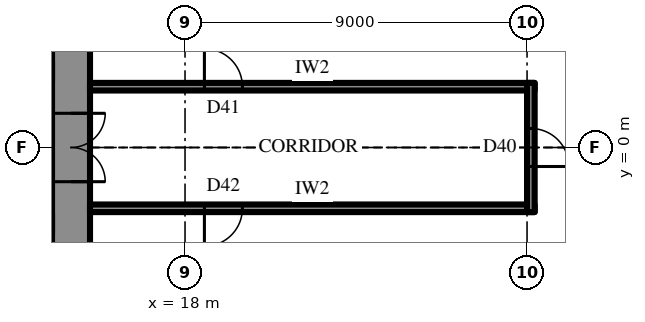
"""IFC4 building model, lengths in metres.
Left out: names, types, materials, properties, quantities, classifications, styles, units other than length and angle.
Written with IfcOpenShell. Run it as: python <this file> out.ifc"""

import sys

from ifc_helpers import new_model, si_unit, direction, frame, frame_2d, origin, place, context, subcontext, project, spatial, rectangle, extrude, element, fill, save


model = new_model("IFC4")
c1 = context("Model", 3, precision=1e-05, world=origin(), true_north=direction((0.0, 1.0)))
c2 = subcontext(c1, "Body", "Model", "MODEL_VIEW")
j1 = project(units=[si_unit("LENGTHUNIT", "METRE"), si_unit("PLANEANGLEUNIT", "RADIAN")], contexts=[c1])
p1 = place(None, origin())
s1 = spatial("IfcSite", under=j1, at=p1, CompositionType="ELEMENT")
p2 = place(p1, origin())
s2 = spatial("IfcBuilding", under=s1, at=p2, CompositionType="ELEMENT")
p3 = place(p2, frame((0.0, 0.0, 236.5)))
s3 = spatial("IfcBuildingStorey", under=s2, at=p3, CompositionType="ELEMENT", Elevation=236.5)
p4 = place(p3, frame((15.0, -10.7, 0.0), z_axis=(0.0, 0.0, 1.0), x_axis=(0.0, 1.0, 0.0)))
e1 = element("IfcWall", 1, at=p4, inside=s3, PredefinedType="SHEAR", context=c2, shape_type="SweptSolid", body=[
    extrude(rectangle(XDim=21.4, YDim=1.0, at=frame_2d((10.7, 0.0))), origin(), (0.0, 0.0, 1.0), 4.2),
])
p5 = place(p4, frame((9.8, 0.0, 0.0)))
e2 = element("IfcOpeningElement", 2, at=p5, cuts=e1, PredefinedType="OPENING", context=c2, shape_type="SweptSolid", body=[
    extrude(rectangle(XDim=1.8, YDim=2.4, at=frame_2d((0.9, 1.2))), frame((0.0, 0.51, 0.0), z_axis=(0.0, -1.0, 0.0), x_axis=(1.0, 0.0, 0.0)), (0.0, 0.0, 1.0), 1.02),
])
p6 = place(p3, frame((12.3, 2.0, 0.0), z_axis=(0.0, 0.0, 1.0), x_axis=(1.0, 0.0, 0.0)))
e3 = element("IfcWall", 3, at=p6, inside=s3, PredefinedType="SHEAR", context=c2, shape_type="SweptSolid", body=[
    extrude(rectangle(XDim=2.2, YDim=0.5, at=frame_2d((1.1, 0.0))), origin(), (0.0, 0.0, 1.0), 4.2),
])
p7 = place(p6, frame((0.8, 0.0, 0.0)))
e4 = element("IfcOpeningElement", 4, at=p7, cuts=e3, PredefinedType="OPENING", context=c2, shape_type="SweptSolid", body=[
    extrude(rectangle(XDim=0.9, YDim=2.2, at=frame_2d((0.45, 1.1))), frame((0.0, 0.26, 0.0), z_axis=(0.0, -1.0, 0.0), x_axis=(1.0, 0.0, 0.0)), (0.0, 0.0, 1.0), 0.52),
])
p8 = place(p3, frame((15.5, 1.6, 0.0), z_axis=(0.0, 0.0, 1.0), x_axis=(1.0, 0.0, 0.0)))
e5 = element("IfcWall", 5, at=p8, inside=s3, PredefinedType="PARTITIONING", context=c2, shape_type="SweptSolid", body=[
    extrude(rectangle(XDim=11.7, YDim=0.2, at=frame_2d((5.85, 0.0))), origin(), (0.0, 0.0, 1.0), 4.0),
])
p9 = place(p8, frame((3.01, 0.0, 0.0)))
e6 = element("IfcOpeningElement", 6, at=p9, cuts=e5, PredefinedType="OPENING", context=c2, shape_type="SweptSolid", body=[
    extrude(rectangle(XDim=1.0, YDim=2.2, at=frame_2d((0.5, 1.1))), frame((0.0, 0.11, 0.0), z_axis=(0.0, -1.0, 0.0), x_axis=(1.0, 0.0, 0.0)), (0.0, 0.0, 1.0), 0.22),
])
p10 = place(p3, frame((15.5, -1.6, 0.0), z_axis=(0.0, 0.0, 1.0), x_axis=(1.0, 0.0, 0.0)))
e7 = element("IfcWall", 7, at=p10, inside=s3, PredefinedType="PARTITIONING", context=c2, shape_type="SweptSolid", body=[
    extrude(rectangle(XDim=11.7, YDim=0.2, at=frame_2d((5.85, 0.0))), origin(), (0.0, 0.0, 1.0), 4.0),
])
p11 = place(p10, frame((3.01, 0.0, 0.0)))
e8 = element("IfcOpeningElement", 8, at=p11, cuts=e7, PredefinedType="OPENING", context=c2, shape_type="SweptSolid", body=[
    extrude(rectangle(XDim=1.0, YDim=2.2, at=frame_2d((0.5, 1.1))), frame((0.0, 0.11, 0.0), z_axis=(0.0, -1.0, 0.0), x_axis=(1.0, 0.0, 0.0)), (0.0, 0.0, 1.0), 0.22),
])
p12 = place(p3, frame((27.1, -1.7, 0.0), z_axis=(0.0, 0.0, 1.0), x_axis=(0.0, 1.0, 0.0)))
e9 = element("IfcWall", 9, at=p12, inside=s3, PredefinedType="PARTITIONING", context=c2, shape_type="SweptSolid", body=[
    extrude(rectangle(XDim=3.4, YDim=0.2, at=frame_2d((1.7, 0.0))), origin(), (0.0, 0.0, 1.0), 4.0),
])
p13 = place(p12, frame((1.2, 0.0, 0.0)))
e10 = element("IfcOpeningElement", 10, at=p13, cuts=e9, PredefinedType="OPENING", context=c2, shape_type="SweptSolid", body=[
    extrude(rectangle(XDim=1.0, YDim=2.2, at=frame_2d((0.5, 1.1))), frame((0.0, 0.11, 0.0), z_axis=(0.0, -1.0, 0.0), x_axis=(1.0, 0.0, 0.0)), (0.0, 0.0, 1.0), 0.22),
])
p14 = place(p5, frame((1.8, 0.0, 0.0), z_axis=(0.0, 0.0, 1.0), x_axis=(-1.0, 0.0, 0.0)))
e11 = element("IfcDoor", 11, at=p14, inside=s3, OperationType="DOUBLE_DOOR_SINGLE_SWING", PredefinedType="DOOR", context=c2, shape_type="SweptSolid", body=[
    extrude(rectangle(XDim=1.8, YDim=2.4, at=frame_2d((0.9, 1.2))), frame((0.0, 0.025, 0.0), z_axis=(0.0, -1.0, 0.0), x_axis=(1.0, 0.0, 0.0)), (0.0, 0.0, 1.0), 0.05),
])
fill(e2, e11)
p15 = place(p9, origin())
e12 = element("IfcDoor", 12, at=p15, inside=s3, OperationType="SINGLE_SWING_RIGHT", PredefinedType="DOOR", context=c2, shape_type="SweptSolid", body=[
    extrude(rectangle(XDim=1.0, YDim=2.2, at=frame_2d((0.5, 1.1))), frame((0.0, 0.025, 0.0), z_axis=(0.0, -1.0, 0.0), x_axis=(1.0, 0.0, 0.0)), (0.0, 0.0, 1.0), 0.05),
])
fill(e6, e12)
p16 = place(p11, frame((1.0, 0.0, 0.0), z_axis=(0.0, 0.0, 1.0), x_axis=(-1.0, 0.0, 0.0)))
e13 = element("IfcDoor", 13, at=p16, inside=s3, OperationType="SINGLE_SWING_LEFT", PredefinedType="DOOR", context=c2, shape_type="SweptSolid", body=[
    extrude(rectangle(XDim=1.0, YDim=2.2, at=frame_2d((0.5, 1.1))), frame((0.0, 0.025, 0.0), z_axis=(0.0, -1.0, 0.0), x_axis=(1.0, 0.0, 0.0)), (0.0, 0.0, 1.0), 0.05),
])
fill(e8, e13)
p17 = place(p13, frame((1.0, 0.0, 0.0), z_axis=(0.0, 0.0, 1.0), x_axis=(-1.0, 0.0, 0.0)))
e14 = element("IfcDoor", 14, at=p17, inside=s3, OperationType="SINGLE_SWING_LEFT", PredefinedType="DOOR", context=c2, shape_type="SweptSolid", body=[
    extrude(rectangle(XDim=1.0, YDim=2.2, at=frame_2d((0.5, 1.1))), frame((0.0, 0.025, 0.0), z_axis=(0.0, -1.0, 0.0), x_axis=(1.0, 0.0, 0.0)), (0.0, 0.0, 1.0), 0.05),
])
fill(e10, e14)
save(model, sys.argv[1])
